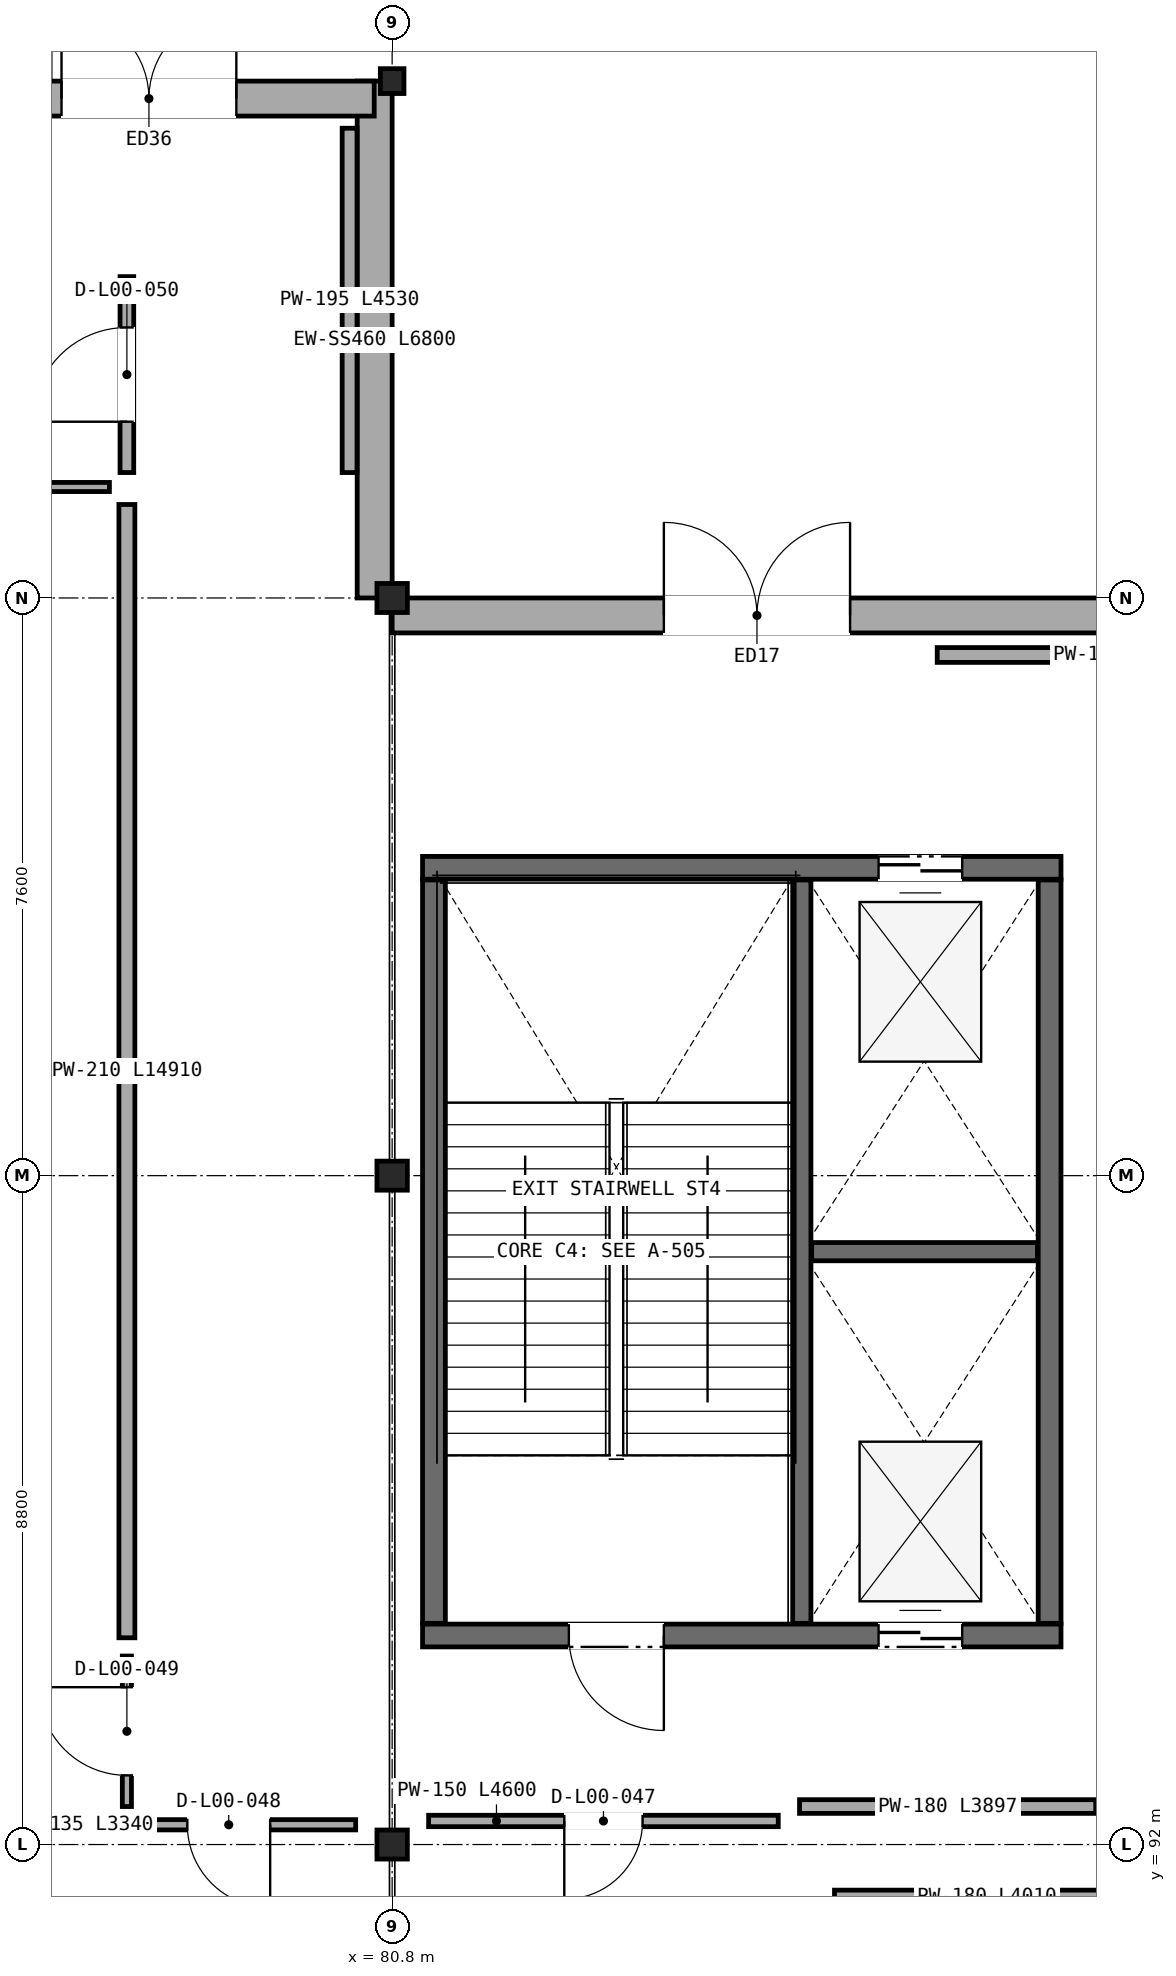
"""IFC4 building model, lengths in metres.
Left out: names, types, materials, properties, quantities, classifications, styles, units other than length and angle.
Written with IfcOpenShell. Run it as: python <this file> out.ifc"""

import sys

from ifc_helpers import new_model, si_unit, direction, frame, frame_2d, origin, origin_2d, place, context, subcontext, project, spatial, rectangle, i_section, extrude, element, fill, save


model = new_model("IFC4")
c1 = context("Model", 3, precision=1e-05, world=origin(), true_north=direction((0.0, 1.0)))
c2 = subcontext(c1, "Body", "Model", "MODEL_VIEW")
j1 = project(units=[si_unit("LENGTHUNIT", "METRE"), si_unit("PLANEANGLEUNIT", "RADIAN")], contexts=[c1])
p1 = place(None, origin())
s1 = spatial("IfcSite", under=j1, at=p1, CompositionType="ELEMENT")
p2 = place(p1, origin())
s2 = spatial("IfcBuilding", under=s1, at=p2, CompositionType="ELEMENT")
p3 = place(p2, origin())
s3 = spatial("IfcBuildingStorey", under=s2, at=p3, CompositionType="ELEMENT", Elevation=0.0)
for number, where, z_axis, x_axis in (
    (1, (80.8, 92.0, 0.0), (0.0, 0.0, 1.0), (1.0, 0.0, 0.0)),
    (2, (80.8, 100.8, 0.0), (0.0, 0.0, 1.0), (1.0, 0.0, 0.0)),
    (3, (80.8, 108.4, 0.0), (0.0, 0.0, 1.0), (1.0, 0.0, 0.0)),
):
    element("IfcColumn", number, at=place(p3, frame(where, z_axis=z_axis, x_axis=x_axis)), inside=s3, PredefinedType="COLUMN", context=c2, shape_type="SweptSolid", body=[
        extrude(i_section(OverallWidth=0.4, OverallDepth=0.382, WebThickness=0.025, FlangeThickness=0.036, at=origin_2d()), origin(), (0.0, 0.0, 1.0), 5.6),
    ])
p4 = place(p3, frame((80.8, 115.2, 0.0), z_axis=(0.0, 0.0, 1.0), x_axis=(1.0, 0.0, 0.0)))
e4 = element("IfcColumn", 4, at=p4, inside=s3, PredefinedType="COLUMN", context=c2, shape_type="SweptSolid", body=[
    extrude(i_section(OverallWidth=0.311, OverallDepth=0.327, WebThickness=0.016, FlangeThickness=0.025, FilletRadius=0.017, at=origin_2d()), origin(), (0.0, 0.0, 1.0), 5.6),
])
p5 = place(p3, frame((119.2, 108.17, 0.0), z_axis=(0.0, 0.0, 1.0), x_axis=(-1.0, 0.0, 0.0)))
e5 = element("IfcWall", 5, at=p5, inside=s3, PredefinedType="SOLIDWALL", context=c2, shape_type="SweptSolid", body=[
    extrude(rectangle(XDim=38.4, YDim=0.46, at=frame_2d((19.2, 0.0))), origin(), (0.0, 0.0, 1.0), 4.653),
])
p6 = place(p5, frame((32.375, 0.0, 0.0)))
e6 = element("IfcOpeningElement", 6, at=p6, cuts=e5, PredefinedType="OPENING", context=c2, shape_type="SweptSolid", body=[
    extrude(rectangle(XDim=2.45, YDim=2.5, at=frame_2d((1.225, 1.25))), frame((0.0, 0.24, 0.0), z_axis=(0.0, -1.0, 0.0), x_axis=(1.0, 0.0, 0.0)), (0.0, 0.0, 1.0), 0.48),
])
p7 = place(p5, frame((22.8, 0.0, 0.0)))
e7 = element("IfcOpeningElement", 7, at=p7, cuts=e5, PredefinedType="OPENING", context=c2, shape_type="SweptSolid", body=[
    extrude(rectangle(XDim=2.4, YDim=2.45, at=frame_2d((1.2, 1.225))), frame((0.0, 0.24, 0.0), z_axis=(0.0, -1.0, 0.0), x_axis=(1.0, 0.0, 0.0)), (0.0, 0.0, 1.0), 0.48),
])
p8 = place(p5, frame((13.25, 0.0, 0.0)))
e8 = element("IfcOpeningElement", 8, at=p8, cuts=e5, PredefinedType="OPENING", context=c2, shape_type="SweptSolid", body=[
    extrude(rectangle(XDim=2.3, YDim=2.4, at=frame_2d((1.15, 1.2))), frame((0.0, 0.24, 0.0), z_axis=(0.0, -1.0, 0.0), x_axis=(1.0, 0.0, 0.0)), (0.0, 0.0, 1.0), 0.48),
])
p9 = place(p5, frame((3.55, 0.0, 0.0)))
e9 = element("IfcOpeningElement", 9, at=p9, cuts=e5, PredefinedType="OPENING", context=c2, shape_type="SweptSolid", body=[
    extrude(rectangle(XDim=2.5, YDim=2.55, at=frame_2d((1.25, 1.275))), frame((0.0, 0.24, 0.0), z_axis=(0.0, -1.0, 0.0), x_axis=(1.0, 0.0, 0.0)), (0.0, 0.0, 1.0), 0.48),
])
p10 = place(p5, frame((20.2, 0.0, 0.9)))
e10 = element("IfcOpeningElement", 10, at=p10, cuts=e5, PredefinedType="OPENING", context=c2, shape_type="SweptSolid", body=[
    extrude(rectangle(XDim=1.52, YDim=1.55, at=frame_2d((0.76, 0.775))), frame((0.0, 0.24, 0.0), z_axis=(0.0, -1.0, 0.0), x_axis=(1.0, 0.0, 0.0)), (0.0, 0.0, 1.0), 0.48),
])
p11 = place(p3, frame((80.57, 108.4, 0.0), z_axis=(0.0, 0.0, 1.0), x_axis=(0.0, 1.0, 0.0)))
e11 = element("IfcWall", 11, at=p11, inside=s3, PredefinedType="SOLIDWALL", context=c2, shape_type="SweptSolid", body=[
    extrude(rectangle(XDim=6.8, YDim=0.46, at=frame_2d((3.4, 0.0))), origin(), (0.0, 0.0, 1.0), 4.653),
])
p12 = place(p3, frame((80.564, 114.97, 0.0), z_axis=(0.0, 0.0, 1.0), x_axis=(-1.0, 0.0, 0.0)))
e12 = element("IfcWall", 12, at=p12, inside=s3, PredefinedType="SOLIDWALL", context=c2, shape_type="SweptSolid", body=[
    extrude(rectangle(XDim=38.164, YDim=0.46, at=frame_2d((19.082, 0.0))), origin(), (0.0, 0.0, 1.0), 4.732),
])
p13 = place(p12, frame((1.814, 0.0, 0.0)))
e13 = element("IfcOpeningElement", 13, at=p13, cuts=e12, PredefinedType="OPENING", context=c2, shape_type="SweptSolid", body=[
    extrude(rectangle(XDim=2.3, YDim=2.4, at=frame_2d((1.15, 1.2))), frame((0.0, 0.24, 0.0), z_axis=(0.0, -1.0, 0.0), x_axis=(1.0, 0.0, 0.0)), (0.0, 0.0, 1.0), 0.48),
])
p14 = place(p12, frame((6.4, 0.0, 0.9)))
e14 = element("IfcOpeningElement", 14, at=p14, cuts=e12, PredefinedType="OPENING", context=c2, shape_type="SweptSolid", body=[
    extrude(rectangle(XDim=1.55, YDim=1.55, at=frame_2d((0.775, 0.775))), frame((0.0, 0.24, 0.0), z_axis=(0.0, -1.0, 0.0), x_axis=(1.0, 0.0, 0.0)), (0.0, 0.0, 1.0), 0.48),
])
p15 = place(p12, frame((15.6, 0.0, 0.9)))
e15 = element("IfcOpeningElement", 15, at=p15, cuts=e12, PredefinedType="OPENING", context=c2, shape_type="SweptSolid", body=[
    extrude(rectangle(XDim=1.82, YDim=1.55, at=frame_2d((0.91, 0.775))), frame((0.0, 0.24, 0.0), z_axis=(0.0, -1.0, 0.0), x_axis=(1.0, 0.0, 0.0)), (0.0, 0.0, 1.0), 0.48),
])
p16 = place(p12, frame((20.2, 0.0, 0.9)))
e16 = element("IfcOpeningElement", 16, at=p16, cuts=e12, PredefinedType="OPENING", context=c2, shape_type="SweptSolid", body=[
    extrude(rectangle(XDim=1.85, YDim=1.55, at=frame_2d((0.925, 0.775))), frame((0.0, 0.24, 0.0), z_axis=(0.0, -1.0, 0.0), x_axis=(1.0, 0.0, 0.0)), (0.0, 0.0, 1.0), 0.48),
])
p17 = place(p12, frame((24.8, 0.0, 0.9)))
e17 = element("IfcOpeningElement", 17, at=p17, cuts=e12, PredefinedType="OPENING", context=c2, shape_type="SweptSolid", body=[
    extrude(rectangle(XDim=2.0, YDim=1.55, at=frame_2d((1.0, 0.775))), frame((0.0, 0.24, 0.0), z_axis=(0.0, -1.0, 0.0), x_axis=(1.0, 0.0, 0.0)), (0.0, 0.0, 1.0), 0.48),
])
p18 = place(p12, frame((29.4, 0.0, 0.9)))
e18 = element("IfcOpeningElement", 18, at=p18, cuts=e12, PredefinedType="OPENING", context=c2, shape_type="SweptSolid", body=[
    extrude(rectangle(XDim=2.2, YDim=1.55, at=frame_2d((1.1, 0.775))), frame((0.0, 0.24, 0.0), z_axis=(0.0, -1.0, 0.0), x_axis=(1.0, 0.0, 0.0)), (0.0, 0.0, 1.0), 0.48),
])
p19 = place(p3, frame((81.2, 94.75, 0.0), z_axis=(0.0, 0.0, 1.0), x_axis=(1.0, 0.0, 0.0)))
e19 = element("IfcWall", 19, at=p19, inside=s3, PredefinedType="SHEAR", context=c2, shape_type="SweptSolid", body=[
    extrude(rectangle(XDim=8.4, YDim=0.3, at=frame_2d((4.2, 0.0))), origin(), (0.0, 0.0, 1.0), 5.345),
])
p20 = place(p19, frame((1.925, 0.0, 0.0)))
e20 = element("IfcOpeningElement", 20, at=p20, cuts=e19, PredefinedType="OPENING", context=c2, shape_type="SweptSolid", body=[
    extrude(rectangle(XDim=1.25, YDim=2.2, at=frame_2d((0.625, 1.1))), frame((0.0, 0.16, 0.0), z_axis=(0.0, -1.0, 0.0), x_axis=(1.0, 0.0, 0.0)), (0.0, 0.0, 1.0), 0.32),
])
p21 = place(p19, frame((6.0, 0.0, 0.0)))
e21 = element("IfcOpeningElement", 21, at=p21, cuts=e19, PredefinedType="OPENING", context=c2, shape_type="SweptSolid", body=[
    extrude(rectangle(XDim=1.1, YDim=2.2, at=frame_2d((0.55, 1.1))), frame((0.0, 0.16, 0.0), z_axis=(0.0, -1.0, 0.0), x_axis=(1.0, 0.0, 0.0)), (0.0, 0.0, 1.0), 0.32),
])
p22 = place(p3, frame((89.6, 104.85, 0.0), z_axis=(0.0, 0.0, 1.0), x_axis=(-1.0, 0.0, 0.0)))
e22 = element("IfcWall", 22, at=p22, inside=s3, PredefinedType="SHEAR", context=c2, shape_type="SweptSolid", body=[
    extrude(rectangle(XDim=8.4, YDim=0.3, at=frame_2d((4.2, 0.0))), origin(), (0.0, 0.0, 1.0), 5.345),
])
p23 = place(p22, frame((1.3, 0.0, 0.0)))
e23 = element("IfcOpeningElement", 23, at=p23, cuts=e22, PredefinedType="OPENING", context=c2, shape_type="SweptSolid", body=[
    extrude(rectangle(XDim=1.1, YDim=2.2, at=frame_2d((0.55, 1.1))), frame((0.0, 0.16, 0.0), z_axis=(0.0, -1.0, 0.0), x_axis=(1.0, 0.0, 0.0)), (0.0, 0.0, 1.0), 0.32),
])
for number, where, z_axis, x_axis in (
    (24, (89.45, 94.91, 0.0), (0.0, 0.0, 1.0), (0.0, 1.0, 0.0)),
    (25, (81.35, 104.69, 0.0), (0.0, 0.0, 1.0), (0.0, -1.0, 0.0)),
):
    element("IfcWall", number, at=place(p3, frame(where, z_axis=z_axis, x_axis=x_axis)), inside=s3, PredefinedType="SHEAR", context=c2, shape_type="SweptSolid", body=[
        extrude(rectangle(XDim=9.78, YDim=0.3, at=frame_2d((4.89, 0.0))), origin(), (0.0, 0.0, 1.0), 5.345),
    ])
p24 = place(p3, frame((86.19, 94.91, 0.0), z_axis=(0.0, 0.0, 1.0), x_axis=(0.0, 1.0, 0.0)))
e26 = element("IfcWall", 26, at=p24, inside=s3, PredefinedType="SOLIDWALL", context=c2, shape_type="SweptSolid", body=[
    extrude(rectangle(XDim=9.78, YDim=0.24, at=frame_2d((4.89, 0.0))), origin(), (0.0, 0.0, 1.0), 5.345),
])
p25 = place(p3, frame((86.32, 99.8, 0.0), z_axis=(0.0, 0.0, 1.0), x_axis=(1.0, 0.0, 0.0)))
e27 = element("IfcWall", 27, at=p25, inside=s3, PredefinedType="SOLIDWALL", context=c2, shape_type="SweptSolid", body=[
    extrude(rectangle(XDim=2.97, YDim=0.24, at=frame_2d((1.485, 0.0))), origin(), (0.0, 0.0, 1.0), 5.345),
])
p26 = place(p3, frame((81.28, 92.31, 0.0), z_axis=(0.0, 0.0, 1.0), x_axis=(1.0, 0.0, 0.0)))
e28 = element("IfcWall", 28, at=p26, inside=s3, PredefinedType="PARTITIONING", context=c2, shape_type="SweptSolid", body=[
    extrude(rectangle(XDim=4.6, YDim=0.15, at=frame_2d((2.3, 0.0))), origin(), (0.0, 0.0, 1.0), 4.708),
])
p27 = place(p26, frame((1.785, 0.0, 0.0)))
e29 = element("IfcOpeningElement", 29, at=p27, cuts=e28, PredefinedType="OPENING", context=c2, shape_type="SweptSolid", body=[
    extrude(rectangle(XDim=1.03, YDim=2.16, at=frame_2d((0.515, 1.08))), frame((0.0, 0.085, 0.0), z_axis=(0.0, -1.0, 0.0), x_axis=(1.0, 0.0, 0.0)), (0.0, 0.0, 1.0), 0.17),
])
p28 = place(p3, frame((76.98, 92.26, 0.0), z_axis=(0.0, 0.0, 1.0), x_axis=(1.0, 0.0, 0.0)))
e30 = element("IfcWall", 30, at=p28, inside=s3, PredefinedType="PARTITIONING", context=c2, shape_type="SweptSolid", body=[
    extrude(rectangle(XDim=3.34, YDim=0.135, at=frame_2d((1.67, 0.0))), origin(), (0.0, 0.0, 1.0), 4.638),
])
p29 = place(p28, frame((1.125, 0.0, 0.0)))
e31 = element("IfcOpeningElement", 31, at=p29, cuts=e30, PredefinedType="OPENING", context=c2, shape_type="SweptSolid", body=[
    extrude(rectangle(XDim=1.09, YDim=2.16, at=frame_2d((0.545, 1.08))), frame((0.0, 0.078, 0.0), z_axis=(0.0, -1.0, 0.0), x_axis=(1.0, 0.0, 0.0)), (0.0, 0.0, 1.0), 0.155),
])
p30 = place(p3, frame((77.31, 94.48, 0.0), z_axis=(0.0, 0.0, 1.0), x_axis=(0.0, -1.0, 0.0)))
e32 = element("IfcWall", 32, at=p30, inside=s3, PredefinedType="PARTITIONING", context=c2, shape_type="SweptSolid", body=[
    extrude(rectangle(XDim=1.98, YDim=0.12, at=frame_2d((0.99, 0.0))), origin(), (0.0, 0.0, 1.0), 5.23),
])
p31 = place(p30, frame((0.41, 0.0, 0.0)))
e33 = element("IfcOpeningElement", 33, at=p31, cuts=e32, PredefinedType="OPENING", context=c2, shape_type="SweptSolid", body=[
    extrude(rectangle(XDim=1.16, YDim=2.16, at=frame_2d((0.58, 1.08))), frame((0.0, 0.07, 0.0), z_axis=(0.0, -1.0, 0.0), x_axis=(1.0, 0.0, 0.0)), (0.0, 0.0, 1.0), 0.14),
])
p32 = place(p3, frame((77.31, 109.63, 0.0), z_axis=(0.0, 0.0, 1.0), x_axis=(0.0, -1.0, 0.0)))
e34 = element("IfcWall", 34, at=p32, inside=s3, PredefinedType="PARTITIONING", context=c2, shape_type="SweptSolid", body=[
    extrude(rectangle(XDim=14.91, YDim=0.21, at=frame_2d((7.455, 0.0))), origin(), (0.0, 0.0, 1.0), 4.638),
])
p33 = place(p3, frame((80.24, 110.05, 0.0), z_axis=(0.0, 0.0, 1.0), x_axis=(0.0, 1.0, 0.0)))
e35 = element("IfcWall", 35, at=p33, inside=s3, PredefinedType="PARTITIONING", context=c2, shape_type="SweptSolid", body=[
    extrude(rectangle(XDim=4.53, YDim=0.195, at=frame_2d((2.265, 0.0))), origin(), (0.0, 0.0, 1.0), 5.23),
])
p34 = place(p3, frame((77.31, 112.628, 0.0), z_axis=(0.0, 0.0, 1.0), x_axis=(0.0, -1.0, 0.0)))
e36 = element("IfcWall", 36, at=p34, inside=s3, PredefinedType="PARTITIONING", context=c2, shape_type="SweptSolid", body=[
    extrude(rectangle(XDim=2.578, YDim=0.18, at=frame_2d((1.289, 0.0))), origin(), (0.0, 0.0, 1.0), 5.23),
])
p35 = place(p34, frame((0.669, 0.0, 0.0)))
e37 = element("IfcOpeningElement", 37, at=p35, cuts=e36, PredefinedType="OPENING", context=c2, shape_type="SweptSolid", body=[
    extrude(rectangle(XDim=1.24, YDim=2.16, at=frame_2d((0.62, 1.08))), frame((0.0, 0.1, 0.0), z_axis=(0.0, -1.0, 0.0), x_axis=(1.0, 0.0, 0.0)), (0.0, 0.0, 1.0), 0.2),
])
p36 = place(p3, frame((86.62, 91.31, 0.0), z_axis=(0.0, 0.0, 1.0), x_axis=(1.0, 0.0, 0.0)))
e38 = element("IfcWall", 38, at=p36, inside=s3, PredefinedType="PARTITIONING", context=c2, shape_type="SweptSolid", body=[
    extrude(rectangle(XDim=4.01, YDim=0.18, at=frame_2d((2.005, 0.0))), origin(), (0.0, 0.0, 1.0), 4.787),
])
p37 = place(p3, frame((86.16, 92.5, 0.0), z_axis=(0.0, 0.0, 1.0), x_axis=(1.0, 0.0, 0.0)))
e39 = element("IfcWall", 39, at=p37, inside=s3, PredefinedType="PARTITIONING", context=c2, shape_type="SweptSolid", body=[
    extrude(rectangle(XDim=3.897, YDim=0.18, at=frame_2d((1.949, 0.0))), origin(), (0.0, 0.0, 1.0), 5.23),
])
p38 = place(p3, frame((92.854, 107.65, 0.0), z_axis=(0.0, 0.0, 1.0), x_axis=(-1.0, 0.0, 0.0)))
e40 = element("IfcWall", 40, at=p38, inside=s3, PredefinedType="PARTITIONING", context=c2, shape_type="SweptSolid", body=[
    extrude(rectangle(XDim=4.882, YDim=0.195, at=frame_2d((2.441, 0.0))), origin(), (0.0, 0.0, 1.0), 4.787),
])
p39 = place(p3, frame((68.28, 92.26, 0.0), z_axis=(0.0, 0.0, 1.0), x_axis=(1.0, 0.0, 0.0)))
e41 = element("IfcWall", 41, at=p39, inside=s3, PredefinedType="PARTITIONING", context=c2, shape_type="SweptSolid", body=[
    extrude(rectangle(XDim=8.7, YDim=0.135, at=frame_2d((4.35, 0.0))), origin(), (0.0, 0.0, 1.0), 4.638),
])
p40 = place(p3, frame((68.28, 109.86, 0.0), z_axis=(0.0, 0.0, 1.0), x_axis=(1.0, 0.0, 0.0)))
e42 = element("IfcWall", 42, at=p40, inside=s3, PredefinedType="PARTITIONING", context=c2, shape_type="SweptSolid", body=[
    extrude(rectangle(XDim=8.8, YDim=0.12, at=frame_2d((4.4, 0.0))), origin(), (0.0, 0.0, 1.0), 4.717),
])
p41 = place(p6, frame((2.45, 0.0, 0.0), z_axis=(0.0, 0.0, 1.0), x_axis=(-1.0, 0.0, 0.0)))
e43 = element("IfcDoor", 43, at=p41, inside=s3, OperationType="DOUBLE_DOOR_SINGLE_SWING", PredefinedType="DOOR", context=c2, shape_type="SweptSolid", body=[
    extrude(rectangle(XDim=2.45, YDim=2.5, at=frame_2d((1.225, 1.25))), frame((0.0, 0.025, 0.0), z_axis=(0.0, -1.0, 0.0), x_axis=(1.0, 0.0, 0.0)), (0.0, 0.0, 1.0), 0.05),
])
fill(e6, e43)
p42 = place(p13, frame((2.3, 0.0, 0.0), z_axis=(0.0, 0.0, 1.0), x_axis=(-1.0, 0.0, 0.0)))
e44 = element("IfcDoor", 44, at=p42, inside=s3, OperationType="DOUBLE_DOOR_SINGLE_SWING", PredefinedType="DOOR", context=c2, shape_type="SweptSolid", body=[
    extrude(rectangle(XDim=2.3, YDim=2.4, at=frame_2d((1.15, 1.2))), frame((0.0, 0.025, 0.0), z_axis=(0.0, -1.0, 0.0), x_axis=(1.0, 0.0, 0.0)), (0.0, 0.0, 1.0), 0.05),
])
fill(e13, e44)
p43 = place(p20, frame((1.25, 0.0, 0.0), z_axis=(0.0, 0.0, 1.0), x_axis=(-1.0, 0.0, 0.0)))
e45 = element("IfcDoor", 45, at=p43, inside=s3, OperationType="SINGLE_SWING_RIGHT", PredefinedType="DOOR", context=c2, shape_type="SweptSolid", body=[
    extrude(rectangle(XDim=1.25, YDim=2.2, at=frame_2d((0.625, 1.1))), frame((0.0, 0.025, 0.0), z_axis=(0.0, -1.0, 0.0), x_axis=(1.0, 0.0, 0.0)), (0.0, 0.0, 1.0), 0.05),
])
fill(e20, e45)
p44 = place(p21, origin())
e46 = element("IfcDoor", 46, at=p44, inside=s3, OperationType="DOUBLE_DOOR_SLIDING", PredefinedType="DOOR", context=c2, shape_type="SweptSolid", body=[
    extrude(rectangle(XDim=1.1, YDim=2.2, at=frame_2d((0.55, 1.1))), frame((0.0, 0.025, 0.0), z_axis=(0.0, -1.0, 0.0), x_axis=(1.0, 0.0, 0.0)), (0.0, 0.0, 1.0), 0.05),
])
fill(e21, e46)
p45 = place(p23, origin())
e47 = element("IfcDoor", 47, at=p45, inside=s3, OperationType="DOUBLE_DOOR_SLIDING", PredefinedType="DOOR", context=c2, shape_type="SweptSolid", body=[
    extrude(rectangle(XDim=1.1, YDim=2.2, at=frame_2d((0.55, 1.1))), frame((0.0, 0.025, 0.0), z_axis=(0.0, -1.0, 0.0), x_axis=(1.0, 0.0, 0.0)), (0.0, 0.0, 1.0), 0.05),
])
fill(e23, e47)
p46 = place(p27, frame((1.03, 0.0, 0.0), z_axis=(0.0, 0.0, 1.0), x_axis=(-1.0, 0.0, 0.0)))
e48 = element("IfcDoor", 48, at=p46, inside=s3, OperationType="SINGLE_SWING_LEFT", PredefinedType="DOOR", context=c2, shape_type="SweptSolid", body=[
    extrude(rectangle(XDim=1.03, YDim=2.16, at=frame_2d((0.515, 1.08))), frame((0.0, 0.025, 0.0), z_axis=(0.0, -1.0, 0.0), x_axis=(1.0, 0.0, 0.0)), (0.0, 0.0, 1.0), 0.05),
])
fill(e29, e48)
p47 = place(p29, frame((1.09, 0.0, 0.0), z_axis=(0.0, 0.0, 1.0), x_axis=(-1.0, 0.0, 0.0)))
e49 = element("IfcDoor", 49, at=p47, inside=s3, OperationType="SINGLE_SWING_RIGHT", PredefinedType="DOOR", context=c2, shape_type="SweptSolid", body=[
    extrude(rectangle(XDim=1.09, YDim=2.16, at=frame_2d((0.545, 1.08))), frame((0.0, 0.025, 0.0), z_axis=(0.0, -1.0, 0.0), x_axis=(1.0, 0.0, 0.0)), (0.0, 0.0, 1.0), 0.05),
])
fill(e31, e49)
p48 = place(p31, frame((1.16, 0.0, 0.0), z_axis=(0.0, 0.0, 1.0), x_axis=(-1.0, 0.0, 0.0)))
e50 = element("IfcDoor", 50, at=p48, inside=s3, OperationType="SINGLE_SWING_LEFT", PredefinedType="DOOR", context=c2, shape_type="SweptSolid", body=[
    extrude(rectangle(XDim=1.16, YDim=2.16, at=frame_2d((0.58, 1.08))), frame((0.0, 0.025, 0.0), z_axis=(0.0, -1.0, 0.0), x_axis=(1.0, 0.0, 0.0)), (0.0, 0.0, 1.0), 0.05),
])
fill(e33, e50)
p49 = place(p35, frame((1.24, 0.0, 0.0), z_axis=(0.0, 0.0, 1.0), x_axis=(-1.0, 0.0, 0.0)))
e51 = element("IfcDoor", 51, at=p49, inside=s3, OperationType="SINGLE_SWING_RIGHT", PredefinedType="DOOR", context=c2, shape_type="SweptSolid", body=[
    extrude(rectangle(XDim=1.24, YDim=2.16, at=frame_2d((0.62, 1.08))), frame((0.0, 0.025, 0.0), z_axis=(0.0, -1.0, 0.0), x_axis=(1.0, 0.0, 0.0)), (0.0, 0.0, 1.0), 0.05),
])
fill(e37, e51)
save(model, sys.argv[1])
